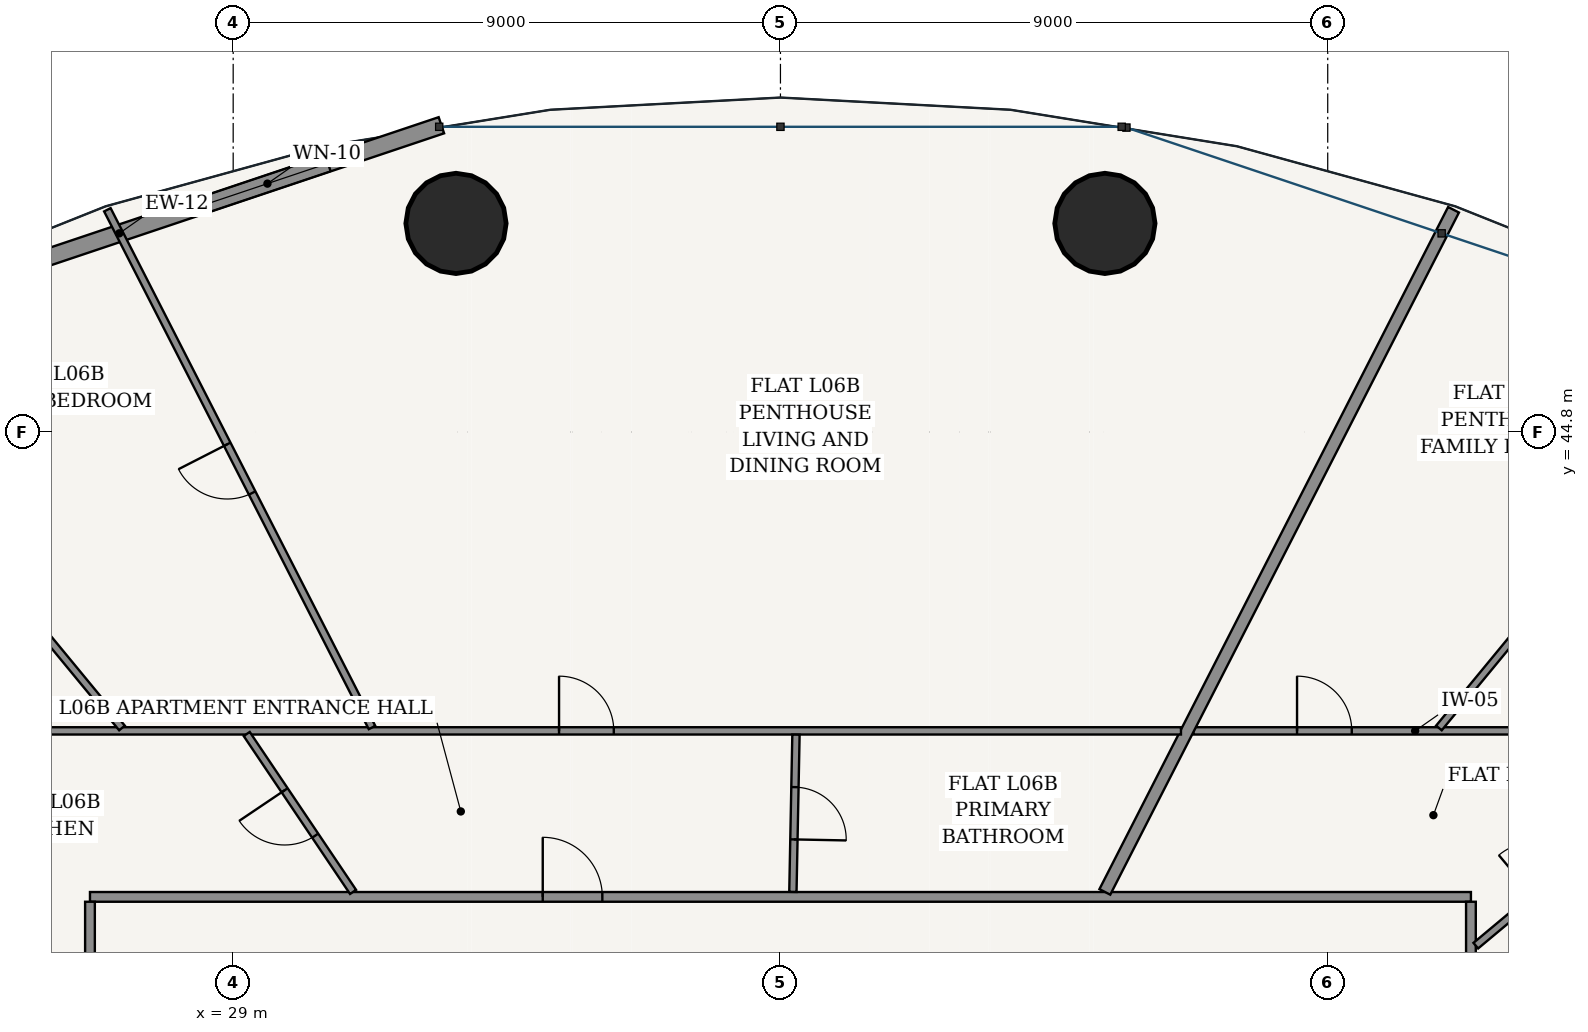
"""IFC4 building model, lengths in metres.
Left out: names, types, materials, properties, quantities, classifications, styles, units other than length and angle.
Written with IfcOpenShell. Run it as: python <this file> out.ifc"""

import sys

from ifc_helpers import new_model, si_unit, direction, frame, frame_2d, origin, origin_2d, place, context, subcontext, project, spatial, rectangle, hollow_circle, extrude, source, transform, mapped, element, fill, save


model = new_model("IFC4")
c1 = context("Model", 3, precision=1e-05, world=origin(), true_north=direction((-0.2419218956, 0.970295726276)))
c2 = subcontext(c1, "Body", "Model", "MODEL_VIEW")
j1 = project(units=[si_unit("LENGTHUNIT", "METRE"), si_unit("PLANEANGLEUNIT", "RADIAN")], contexts=[c1])
p1 = place(None, origin())
s1 = spatial("IfcSite", under=j1, at=p1, CompositionType="ELEMENT")
p2 = place(p1, origin())
s2 = spatial("IfcBuilding", under=s1, at=p2, CompositionType="ELEMENT")
p3 = place(p2, frame((0.0, 0.0, 27.6)))
s3 = spatial("IfcBuildingStorey", under=s2, at=p3, CompositionType="ELEMENT", Elevation=27.6)
for number, where, z_axis, x_axis in (
    (1, (43.336, 48.23, 0.0), (0.0, 0.0, 1.0), (1.0, 0.0, 0.0)),
    (2, (32.664, 48.23, 0.0), (0.0, 0.0, 1.0), (1.0, 0.0, 0.0)),
):
    element("IfcColumn", number, at=place(p3, frame(where, z_axis=z_axis, x_axis=x_axis)), inside=s3, PredefinedType="COLUMN", context=c2, shape_type="SweptSolid", body=[
        extrude(hollow_circle(Radius=0.825, WallThickness=0.05, at=origin_2d()), origin(), (0.0, 0.0, 1.0), 3.6),
    ])
p4 = place(p3, frame((32.424, 49.844, 0.0), z_axis=(0.0, 0.0, 1.0), x_axis=(-0.948041258496, -0.318147406385, 0.0)))
e3 = element("IfcWall", 3, at=p4, inside=s3, PredefinedType="SOLIDWALL", context=c2, shape_type="SweptSolid", body=[
    extrude(rectangle(XDim=11.175, YDim=0.28, at=frame_2d((5.588, 0.0))), origin(), (0.0, 0.0, 1.0), 3.32),
])
p5 = place(p4, frame((1.967, 0.0, 0.85)))
e4 = element("IfcOpeningElement", 4, at=p5, cuts=e3, PredefinedType="OPENING", context=c2, shape_type="SweptSolid", body=[
    extrude(rectangle(XDim=2.1, YDim=1.95, at=frame_2d((1.05, 0.975))), frame((0.0, 0.15, 0.0), z_axis=(0.0, -1.0, 0.0), x_axis=(1.0, 0.0, 0.0)), (0.0, 0.0, 1.0), 0.3),
])
p6 = place(p4, frame((7.108, 0.0, 0.85)))
e5 = element("IfcOpeningElement", 5, at=p6, cuts=e3, PredefinedType="OPENING", context=c2, shape_type="SweptSolid", body=[
    extrude(rectangle(XDim=2.1, YDim=1.95, at=frame_2d((1.05, 0.975))), frame((0.0, 0.15, 0.0), z_axis=(0.0, -1.0, 0.0), x_axis=(1.0, 0.0, 0.0)), (0.0, 0.0, 1.0), 0.3),
])
p7 = place(p3, frame((26.645, 37.155, 0.0), z_axis=(0.0, 0.0, 1.0), x_axis=(1.0, 0.0, 0.0)))
e6 = element("IfcWall", 6, at=p7, inside=s3, PredefinedType="PARTITIONING", context=c2, shape_type="SweptSolid", body=[
    extrude(rectangle(XDim=22.71, YDim=0.16, at=frame_2d((11.355, 0.0))), origin(), (0.0, 0.0, 1.0), 2.688),
])
p8 = place(p7, frame((7.446, 0.0, 0.0)))
e7 = element("IfcOpeningElement", 7, at=p8, cuts=e6, PredefinedType="OPENING", context=c2, shape_type="SweptSolid", body=[
    extrude(rectangle(XDim=0.98, YDim=2.2, at=frame_2d((0.49, 1.1))), frame((0.0, 0.09, 0.0), z_axis=(0.0, -1.0, 0.0), x_axis=(1.0, 0.0, 0.0)), (0.0, 0.0, 1.0), 0.18),
])
p9 = place(p3, frame((26.645, 16.525, 0.0), z_axis=(0.0, 0.0, 1.0), x_axis=(0.0, 1.0, 0.0)))
e8 = element("IfcWall", 8, at=p9, inside=s3, PredefinedType="PARTITIONING", context=c2, shape_type="SweptSolid", body=[
    extrude(rectangle(XDim=20.55, YDim=0.16, at=frame_2d((10.275, 0.0))), origin(), (0.0, 0.0, 1.0), 2.688),
])
p10 = place(p3, frame((49.355, 16.525, 0.0), z_axis=(0.0, 0.0, 1.0), x_axis=(0.0, 1.0, 0.0)))
e9 = element("IfcWall", 9, at=p10, inside=s3, PredefinedType="PARTITIONING", context=c2, shape_type="SweptSolid", body=[
    extrude(rectangle(XDim=20.55, YDim=0.16, at=frame_2d((10.275, 0.0))), origin(), (0.0, 0.0, 1.0), 2.688),
])
p11 = place(p10, frame((15.635, 0.0, 0.0)))
e10 = element("IfcOpeningElement", 10, at=p11, cuts=e9, PredefinedType="OPENING", context=c2, shape_type="SweptSolid", body=[
    extrude(rectangle(XDim=0.98, YDim=2.2, at=frame_2d((0.49, 1.1))), frame((0.0, 0.09, 0.0), z_axis=(0.0, -1.0, 0.0), x_axis=(1.0, 0.0, 0.0)), (0.0, 0.0, 1.0), 0.18),
])
p12 = place(p3, frame((44.791, 39.885, 0.0), z_axis=(0.0, 0.0, 1.0), x_axis=(1.0, 0.0, 0.0)))
e11 = element("IfcWall", 11, at=p12, inside=s3, PredefinedType="PARTITIONING", context=c2, shape_type="SweptSolid", body=[
    extrude(rectangle(XDim=7.294, YDim=0.12, at=frame_2d((3.647, 0.0))), origin(), (0.0, 0.0, 1.0), 2.688),
])
p13 = place(p12, frame((1.705, 0.0, 0.0)))
e12 = element("IfcOpeningElement", 12, at=p13, cuts=e11, PredefinedType="OPENING", context=c2, shape_type="SweptSolid", body=[
    extrude(rectangle(XDim=0.9, YDim=2.15, at=frame_2d((0.45, 1.075))), frame((0.0, 0.07, 0.0), z_axis=(0.0, -1.0, 0.0), x_axis=(1.0, 0.0, 0.0)), (0.0, 0.0, 1.0), 0.14),
])
p14 = place(p3, frame((48.829, 39.933, 0.0), z_axis=(0.0, 0.0, 1.0), x_axis=(0.636192172227, 0.771530634516, 0.0)))
e13 = element("IfcWall", 13, at=p14, inside=s3, PredefinedType="PARTITIONING", context=c2, shape_type="SweptSolid", body=[
    extrude(rectangle(XDim=8.186, YDim=0.12, at=frame_2d((4.093, 0.0))), origin(), (0.0, 0.0, 1.0), 2.688),
])
p15 = place(p3, frame((49.435, 36.353, 0.0), z_axis=(0.0, 0.0, 1.0), x_axis=(0.76742398833, 0.641139939589, 0.0)))
e14 = element("IfcWall", 14, at=p15, inside=s3, PredefinedType="PARTITIONING", context=c2, shape_type="SweptSolid", body=[
    extrude(rectangle(XDim=3.391, YDim=0.12, at=frame_2d((1.695, 0.0))), origin(), (0.0, 0.0, 1.0), 2.999),
])
p16 = place(p15, frame((1.246, 0.0, 0.0)))
e15 = element("IfcOpeningElement", 15, at=p16, cuts=e14, PredefinedType="OPENING", context=c2, shape_type="SweptSolid", body=[
    extrude(rectangle(XDim=0.9, YDim=2.15, at=frame_2d((0.45, 1.075))), frame((0.0, 0.07, 0.0), z_axis=(0.0, -1.0, 0.0), x_axis=(1.0, 0.0, 0.0)), (0.0, 0.0, 1.0), 0.14),
])
p17 = place(p3, frame((43.335, 37.237, 0.0), z_axis=(0.0, 0.0, 1.0), x_axis=(0.455148959499, 0.890415310216, 0.0)))
e16 = element("IfcWall", 16, at=p17, inside=s3, PredefinedType="PARTITIONING", context=c2, shape_type="SweptSolid", body=[
    extrude(rectangle(XDim=12.598, YDim=0.2, at=frame_2d((6.299, 0.0))), origin(), (0.0, 0.0, 1.0), 2.762),
])
p18 = place(p3, frame((23.915, 39.885, 0.0), z_axis=(0.0, 0.0, 1.0), x_axis=(1.0, 0.0, 0.0)))
e17 = element("IfcWall", 17, at=p18, inside=s3, PredefinedType="PARTITIONING", context=c2, shape_type="SweptSolid", body=[
    extrude(rectangle(XDim=20.671, YDim=0.12, at=frame_2d((10.336, 0.0))), origin(), (0.0, 0.0, 1.0), 2.688),
])
p19 = place(p18, frame((10.444, 0.0, 0.0)))
e18 = element("IfcOpeningElement", 18, at=p19, cuts=e17, PredefinedType="OPENING", context=c2, shape_type="SweptSolid", body=[
    extrude(rectangle(XDim=0.9, YDim=2.15, at=frame_2d((0.45, 1.075))), frame((0.0, 0.07, 0.0), z_axis=(0.0, -1.0, 0.0), x_axis=(1.0, 0.0, 0.0)), (0.0, 0.0, 1.0), 0.14),
])
p20 = place(p3, frame((31.283, 39.94, 0.0), z_axis=(0.0, 0.0, 1.0), x_axis=(-0.455131303234, 0.890424335256, 0.0)))
e19 = element("IfcWall", 19, at=p20, inside=s3, PredefinedType="PARTITIONING", context=c2, shape_type="SweptSolid", body=[
    extrude(rectangle(XDim=9.562, YDim=0.12, at=frame_2d((4.781, 0.0))), origin(), (0.0, 0.0, 1.0), 2.762),
])
p21 = place(p20, frame((4.331, 0.0, 0.0)))
e20 = element("IfcOpeningElement", 20, at=p21, cuts=e19, PredefinedType="OPENING", context=c2, shape_type="SweptSolid", body=[
    extrude(rectangle(XDim=0.9, YDim=2.15, at=frame_2d((0.45, 1.075))), frame((0.0, 0.07, 0.0), z_axis=(0.0, -1.0, 0.0), x_axis=(1.0, 0.0, 0.0)), (0.0, 0.0, 1.0), 0.14),
])
p22 = place(p3, frame((27.171, 39.933, 0.0), z_axis=(0.0, 0.0, 1.0), x_axis=(-0.636192172227, 0.771530634516, 0.0)))
e21 = element("IfcWall", 21, at=p22, inside=s3, PredefinedType="PARTITIONING", context=c2, shape_type="SweptSolid", body=[
    extrude(rectangle(XDim=8.186, YDim=0.12, at=frame_2d((4.093, 0.0))), origin(), (0.0, 0.0, 1.0), 2.688),
])
p23 = place(p22, frame((2.579, 0.0, 0.0)))
e22 = element("IfcOpeningElement", 22, at=p23, cuts=e21, PredefinedType="OPENING", context=c2, shape_type="SweptSolid", body=[
    extrude(rectangle(XDim=0.9, YDim=2.15, at=frame_2d((0.45, 1.075))), frame((0.0, 0.07, 0.0), z_axis=(0.0, -1.0, 0.0), x_axis=(1.0, 0.0, 0.0)), (0.0, 0.0, 1.0), 0.14),
])
p24 = place(p3, frame((38.205, 37.237, 0.0), z_axis=(0.0, 0.0, 1.0), x_axis=(0.019633676934, 0.999807240787, 0.0)))
e23 = element("IfcWall", 23, at=p24, inside=s3, PredefinedType="PARTITIONING", context=c2, shape_type="SweptSolid", body=[
    extrude(rectangle(XDim=2.586, YDim=0.12, at=frame_2d((1.293, 0.0))), origin(), (0.0, 0.0, 1.0), 3.32),
])
p25 = place(p24, frame((0.863, 0.0, 0.0)))
e24 = element("IfcOpeningElement", 24, at=p25, cuts=e23, PredefinedType="OPENING", context=c2, shape_type="SweptSolid", body=[
    extrude(rectangle(XDim=0.86, YDim=2.15, at=frame_2d((0.43, 1.075))), frame((0.0, 0.07, 0.0), z_axis=(0.0, -1.0, 0.0), x_axis=(1.0, 0.0, 0.0)), (0.0, 0.0, 1.0), 0.14),
])
p26 = place(p3, frame((30.972, 37.237, 0.0), z_axis=(0.0, 0.0, 1.0), x_axis=(-0.558563154585, 0.829461995717, 0.0)))
e25 = element("IfcWall", 25, at=p26, inside=s3, PredefinedType="PARTITIONING", context=c2, shape_type="SweptSolid", body=[
    extrude(rectangle(XDim=3.131, YDim=0.12, at=frame_2d((1.565, 0.0))), origin(), (0.0, 0.0, 1.0), 3.32),
])
p27 = place(p26, frame((1.115, 0.0, 0.0)))
e26 = element("IfcOpeningElement", 26, at=p27, cuts=e25, PredefinedType="OPENING", context=c2, shape_type="SweptSolid", body=[
    extrude(rectangle(XDim=0.9, YDim=2.15, at=frame_2d((0.45, 1.075))), frame((0.0, 0.07, 0.0), z_axis=(0.0, -1.0, 0.0), x_axis=(1.0, 0.0, 0.0)), (0.0, 0.0, 1.0), 0.14),
])
p28 = place(p3, frame((26.565, 35.15, 0.0), z_axis=(0.0, 0.0, 1.0), x_axis=(-0.807606444557, 0.589721824855, 0.0)))
e27 = element("IfcWall", 27, at=p28, inside=s3, PredefinedType="PARTITIONING", context=c2, shape_type="SweptSolid", body=[
    extrude(rectangle(XDim=3.219, YDim=0.12, at=frame_2d((1.61, 0.0))), origin(), (0.0, 0.0, 1.0), 3.32),
])
p29 = place(p28, frame((1.16, 0.0, 0.0)))
e28 = element("IfcOpeningElement", 28, at=p29, cuts=e27, PredefinedType="OPENING", context=c2, shape_type="SweptSolid", body=[
    extrude(rectangle(XDim=0.9, YDim=2.15, at=frame_2d((0.45, 1.075))), frame((0.0, 0.07, 0.0), z_axis=(0.0, -1.0, 0.0), x_axis=(1.0, 0.0, 0.0)), (0.0, 0.0, 1.0), 0.14),
])
m1 = source(origin(), c2, "Body", "SweptSolid", [
    extrude(rectangle(XDim=2.1, YDim=1.95, at=frame_2d((1.05, 0.975))), frame((0.0, 0.03, 0.0), z_axis=(0.0, -1.0, 0.0), x_axis=(1.0, 0.0, 0.0)), (0.0, 0.0, 1.0), 0.06),
])
p30 = place(p5, origin())
e29 = element("IfcWindow", 29, at=p30, inside=s3, PartitioningType="SINGLE_PANEL", PredefinedType="WINDOW", context=c2, shape_type="MappedRepresentation", body=[
    mapped(m1, transform((0.0, 0.0, 0.0), scale=1.0)),
])
fill(e4, e29)
m2 = source(origin(), c2, "Body", "SweptSolid", [
    extrude(rectangle(XDim=0.9, YDim=2.15, at=frame_2d((0.45, 1.075))), frame((0.0, 0.025, 0.0), z_axis=(0.0, -1.0, 0.0), x_axis=(1.0, 0.0, 0.0)), (0.0, 0.0, 1.0), 0.05),
])
p31 = place(p13, origin())
e30 = element("IfcDoor", 30, at=p31, inside=s3, OperationType="SINGLE_SWING_LEFT", PredefinedType="DOOR", context=c2, shape_type="MappedRepresentation", body=[
    mapped(m2, transform((0.0, 0.0, 0.0), scale=1.0)),
])
fill(e12, e30)
m3 = source(origin(), c2, "Body", "SweptSolid", [
    extrude(rectangle(XDim=0.98, YDim=2.2, at=frame_2d((0.49, 1.1))), frame((0.0, 0.025, 0.0), z_axis=(0.0, -1.0, 0.0), x_axis=(1.0, 0.0, 0.0)), (0.0, 0.0, 1.0), 0.05),
])
p32 = place(p8, origin())
e31 = element("IfcDoor", 31, at=p32, inside=s3, OperationType="SINGLE_SWING_LEFT", PredefinedType="DOOR", context=c2, shape_type="MappedRepresentation", body=[
    mapped(m3, transform((0.0, 0.0, 0.0), scale=1.0)),
])
fill(e7, e31)
m4 = source(origin(), c2, "Body", "SweptSolid", [
    extrude(rectangle(XDim=0.86, YDim=2.15, at=frame_2d((0.43, 1.075))), frame((0.0, 0.025, 0.0), z_axis=(0.0, -1.0, 0.0), x_axis=(1.0, 0.0, 0.0)), (0.0, 0.0, 1.0), 0.05),
])
p33 = place(p25, frame((0.86, 0.0, 0.0), z_axis=(0.0, 0.0, 1.0), x_axis=(-1.0, 0.0, 0.0)))
e32 = element("IfcDoor", 32, at=p33, inside=s3, OperationType="SINGLE_SWING_RIGHT", PredefinedType="DOOR", context=c2, shape_type="MappedRepresentation", body=[
    mapped(m4, transform((0.0, 0.0, 0.0), scale=1.0)),
])
fill(e24, e32)
p34 = place(p19, origin())
e33 = element("IfcDoor", 33, at=p34, inside=s3, OperationType="SINGLE_SWING_LEFT", PredefinedType="DOOR", context=c2, shape_type="MappedRepresentation", body=[
    mapped(m2, transform((0.0, 0.0, 0.0), scale=1.0)),
])
fill(e18, e33)
p35 = place(p27, origin())
e34 = element("IfcDoor", 34, at=p35, inside=s3, OperationType="SINGLE_SWING_RIGHT", PredefinedType="DOOR", context=c2, shape_type="MappedRepresentation", body=[
    mapped(m2, transform((0.0, 0.0, 0.0), scale=1.0)),
])
fill(e26, e34)
p36 = place(p21, origin())
e35 = element("IfcDoor", 35, at=p36, inside=s3, OperationType="SINGLE_SWING_RIGHT", PredefinedType="DOOR", context=c2, shape_type="MappedRepresentation", body=[
    mapped(m2, transform((0.0, 0.0, 0.0), scale=1.0)),
])
fill(e20, e35)
save(model, sys.argv[1])
